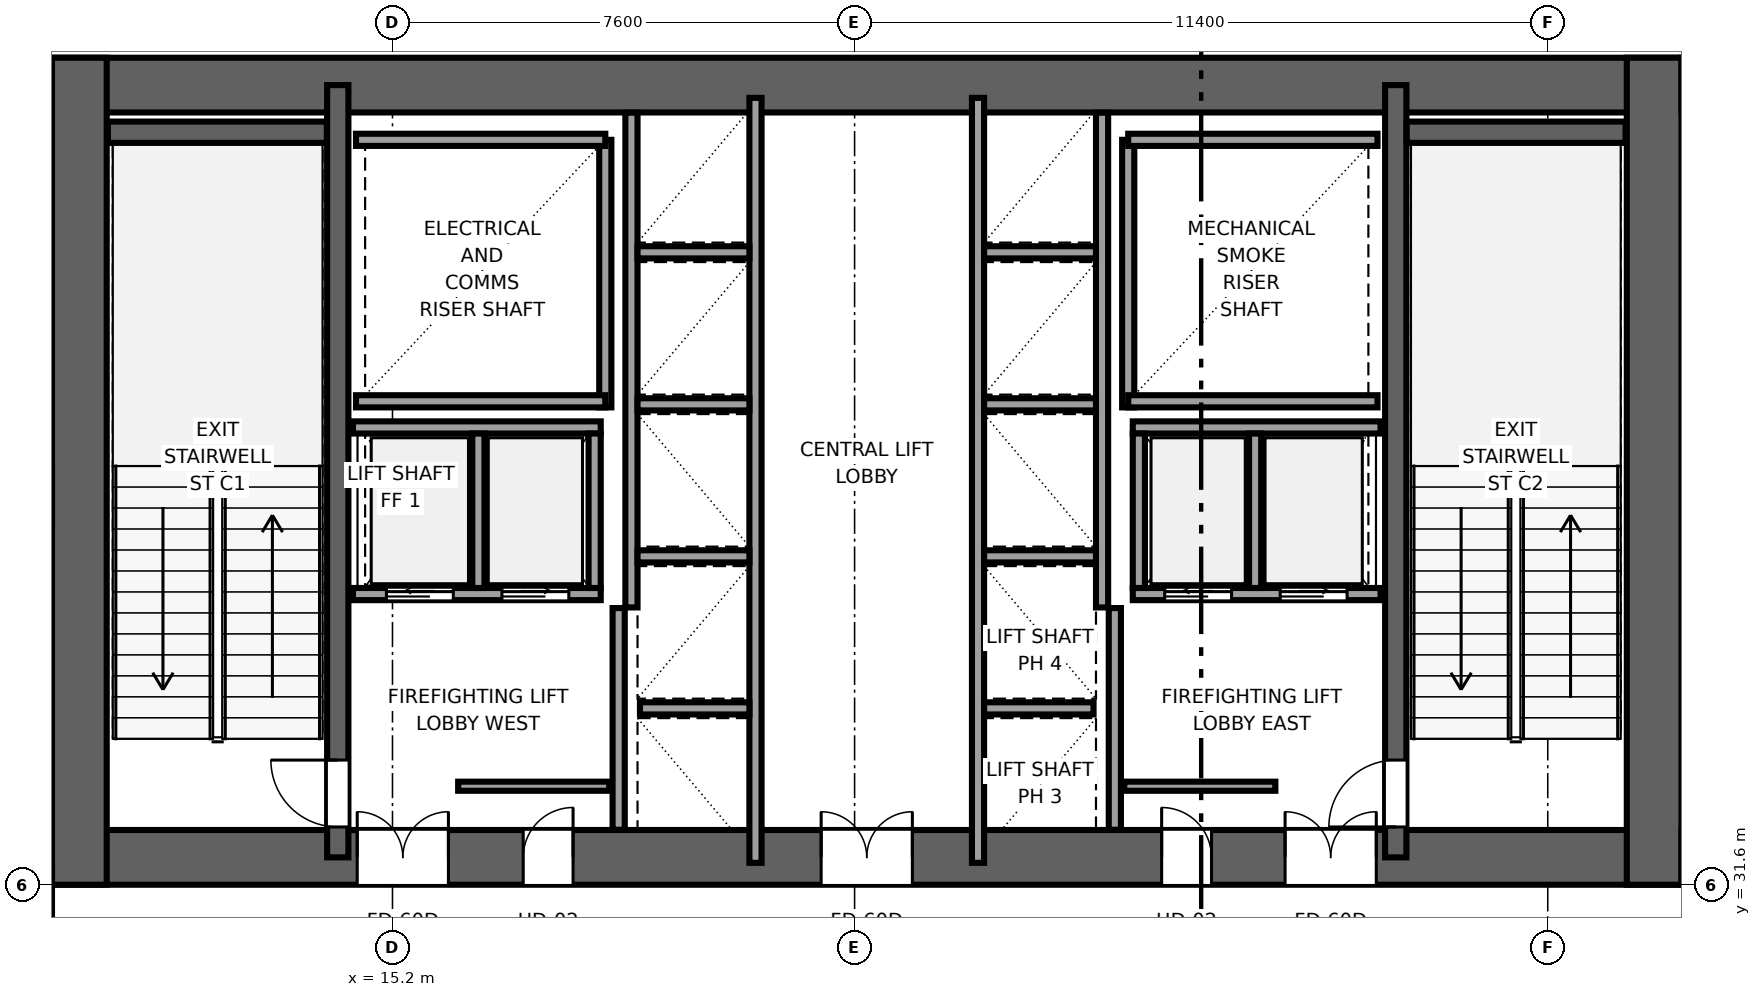
"""IFC4 building model, lengths in metres.
Left out: names, types, materials, properties, quantities, classifications, styles, units other than length and angle.
Written with IfcOpenShell. Run it as: python <this file> out.ifc"""

import sys

from ifc_helpers import new_model, si_unit, direction, frame, frame_2d, origin, place, context, subcontext, project, spatial, rectangle, extrude, source, transform, mapped, element, fill, save


model = new_model("IFC4")
c1 = context("Model", 3, precision=1e-05, world=origin(), true_north=direction((0.0, 1.0)))
c2 = subcontext(c1, "Body", "Model", "MODEL_VIEW")
j1 = project(units=[si_unit("LENGTHUNIT", "METRE"), si_unit("PLANEANGLEUNIT", "RADIAN")], contexts=[c1])
p1 = place(None, origin())
s1 = spatial("IfcSite", under=j1, at=p1, CompositionType="ELEMENT")
p2 = place(p1, origin())
s2 = spatial("IfcBuilding", under=s1, at=p2, CompositionType="ELEMENT")
p3 = place(p2, frame((0.0, 0.0, 11.0)))
s3 = spatial("IfcBuildingStorey", under=s2, at=p3, CompositionType="ELEMENT", Elevation=11.0)
p4 = place(p3, frame((9.6, 32.05, 0.0), z_axis=(0.0, 0.0, 1.0), x_axis=(1.0, 0.0, 0.0)))
e1 = element("IfcWall", 1, at=p4, inside=s3, PredefinedType="SHEAR", context=c2, shape_type="SweptSolid", body=[
    extrude(rectangle(XDim=26.8, YDim=0.9, at=frame_2d((13.4, 0.0))), origin(), (0.0, 0.0, 1.0), 5.0),
])
p5 = place(p4, frame((6.52, 0.0, 0.0), z_axis=(0.0, 0.0, 1.0), x_axis=(-1.0, 0.0, 0.0)))
e2 = element("IfcOpeningElement", 2, at=p5, cuts=e1, PredefinedType="OPENING", context=c2, shape_type="SweptSolid", body=[
    extrude(rectangle(XDim=1.5, YDim=2.04, at=frame_2d((0.75, 1.02))), frame((0.0, 0.46, 0.0), z_axis=(0.0, -1.0, 0.0), x_axis=(1.0, 0.0, 0.0)), (0.0, 0.0, 1.0), 0.92),
])
p6 = place(p4, frame((14.15, 0.0, 0.0), z_axis=(0.0, 0.0, 1.0), x_axis=(-1.0, 0.0, 0.0)))
e3 = element("IfcOpeningElement", 3, at=p6, cuts=e1, PredefinedType="OPENING", context=c2, shape_type="SweptSolid", body=[
    extrude(rectangle(XDim=1.5, YDim=2.04, at=frame_2d((0.75, 1.02))), frame((0.0, 0.46, 0.0), z_axis=(0.0, -1.0, 0.0), x_axis=(1.0, 0.0, 0.0)), (0.0, 0.0, 1.0), 0.92),
])
p7 = place(p4, frame((21.78, 0.0, 0.0), z_axis=(0.0, 0.0, 1.0), x_axis=(-1.0, 0.0, 0.0)))
e4 = element("IfcOpeningElement", 4, at=p7, cuts=e1, PredefinedType="OPENING", context=c2, shape_type="SweptSolid", body=[
    extrude(rectangle(XDim=1.5, YDim=2.04, at=frame_2d((0.75, 1.02))), frame((0.0, 0.46, 0.0), z_axis=(0.0, -1.0, 0.0), x_axis=(1.0, 0.0, 0.0)), (0.0, 0.0, 1.0), 0.92),
])
p8 = place(p4, frame((8.57, 0.0, 0.0), z_axis=(0.0, 0.0, 1.0), x_axis=(-1.0, 0.0, 0.0)))
e5 = element("IfcOpeningElement", 5, at=p8, cuts=e1, PredefinedType="OPENING", context=c2, shape_type="SweptSolid", body=[
    extrude(rectangle(XDim=0.82, YDim=2.01, at=frame_2d((0.41, 1.005))), frame((0.0, 0.46, 0.0), z_axis=(0.0, -1.0, 0.0), x_axis=(1.0, 0.0, 0.0)), (0.0, 0.0, 1.0), 0.92),
])
p9 = place(p4, frame((19.07, 0.0, 0.0), z_axis=(0.0, 0.0, 1.0), x_axis=(-1.0, 0.0, 0.0)))
e6 = element("IfcOpeningElement", 6, at=p9, cuts=e1, PredefinedType="OPENING", context=c2, shape_type="SweptSolid", body=[
    extrude(rectangle(XDim=0.82, YDim=2.01, at=frame_2d((0.41, 1.005))), frame((0.0, 0.46, 0.0), z_axis=(0.0, -1.0, 0.0), x_axis=(1.0, 0.0, 0.0)), (0.0, 0.0, 1.0), 0.92),
])
p10 = place(p3, frame((9.6, 44.75, 0.0), z_axis=(0.0, 0.0, 1.0), x_axis=(1.0, 0.0, 0.0)))
e7 = element("IfcWall", 7, at=p10, inside=s3, PredefinedType="SHEAR", context=c2, shape_type="SweptSolid", body=[
    extrude(rectangle(XDim=26.8, YDim=0.9, at=frame_2d((13.4, 0.0))), origin(), (0.0, 0.0, 1.0), 5.0),
])
for number, where, z_axis, x_axis in (
    (8, (10.05, 31.6, 0.0), (0.0, 0.0, 1.0), (0.0, 1.0, 0.0)),
    (9, (35.95, 31.6, 0.0), (0.0, 0.0, 1.0), (0.0, 1.0, 0.0)),
):
    element("IfcWall", number, at=place(p3, frame(where, z_axis=z_axis, x_axis=x_axis)), inside=s3, PredefinedType="SHEAR", context=c2, shape_type="SweptSolid", body=[
        extrude(rectangle(XDim=13.6, YDim=0.9, at=frame_2d((6.8, 0.0))), origin(), (0.0, 0.0, 1.0), 5.0),
    ])
p11 = place(p3, frame((14.3, 32.05, 0.0), z_axis=(0.0, 0.0, 1.0), x_axis=(0.0, 1.0, 0.0)))
e10 = element("IfcWall", 10, at=p11, inside=s3, PredefinedType="SHEAR", context=c2, shape_type="SweptSolid", body=[
    extrude(rectangle(XDim=12.7, YDim=0.35, at=frame_2d((6.35, 0.0))), origin(), (0.0, 0.0, 1.0), 5.0),
])
p12 = place(p11, frame((0.5, 0.0, 0.0)))
e11 = element("IfcOpeningElement", 11, at=p12, cuts=e10, PredefinedType="OPENING", context=c2, shape_type="SweptSolid", body=[
    extrude(rectangle(XDim=1.1, YDim=2.12, at=frame_2d((0.55, 1.06))), frame((0.0, 0.185, 0.0), z_axis=(0.0, -1.0, 0.0), x_axis=(1.0, 0.0, 0.0)), (0.0, 0.0, 1.0), 0.37),
])
p13 = place(p3, frame((31.7, 32.05, 0.0), z_axis=(0.0, 0.0, 1.0), x_axis=(0.0, 1.0, 0.0)))
e12 = element("IfcWall", 12, at=p13, inside=s3, PredefinedType="SHEAR", context=c2, shape_type="SweptSolid", body=[
    extrude(rectangle(XDim=12.7, YDim=0.35, at=frame_2d((6.35, 0.0))), origin(), (0.0, 0.0, 1.0), 5.0),
])
p14 = place(p13, frame((1.6, 0.0, 0.0), z_axis=(0.0, 0.0, 1.0), x_axis=(-1.0, 0.0, 0.0)))
e13 = element("IfcOpeningElement", 13, at=p14, cuts=e12, PredefinedType="OPENING", context=c2, shape_type="SweptSolid", body=[
    extrude(rectangle(XDim=1.1, YDim=2.12, at=frame_2d((0.55, 1.06))), frame((0.0, 0.185, 0.0), z_axis=(0.0, -1.0, 0.0), x_axis=(1.0, 0.0, 0.0)), (0.0, 0.0, 1.0), 0.37),
])
for number, where, z_axis, x_axis in (
    (14, (10.52, 43.975, 0.0), (0.0, 0.0, 1.0), (1.0, 0.0, 0.0)),
    (15, (31.88, 43.975, 0.0), (0.0, 0.0, 1.0), (1.0, 0.0, 0.0)),
):
    element("IfcWall", number, at=place(p3, frame(where, z_axis=z_axis, x_axis=x_axis)), inside=s3, PredefinedType="SHEAR", context=c2, shape_type="SweptSolid", body=[
        extrude(rectangle(XDim=3.6, YDim=0.35, at=frame_2d((1.8, 0.0))), origin(), (0.0, 0.0, 1.0), 5.0),
    ])
p15 = place(p3, frame((18.7, 39.45, 0.0), z_axis=(0.0, 0.0, 1.0), x_axis=(0.0, 1.0, 0.0)))
e16 = element("IfcWall", 16, at=p15, inside=s3, PredefinedType="SOLIDWALL", context=c2, shape_type="SweptSolid", body=[
    extrude(rectangle(XDim=4.4, YDim=0.2, at=frame_2d((2.2, 0.0))), origin(), (0.0, 0.0, 1.0), 4.74),
])
for number, where, z_axis, x_axis in (
    (17, (14.6, 39.55, 0.0), (0.0, 0.0, 1.0), (1.0, 0.0, 0.0)),
    (18, (14.6, 43.85, 0.0), (0.0, 0.0, 1.0), (1.0, 0.0, 0.0)),
):
    element("IfcWall", number, at=place(p3, frame(where, z_axis=z_axis, x_axis=x_axis)), inside=s3, PredefinedType="SOLIDWALL", context=c2, shape_type="SweptSolid", body=[
        extrude(rectangle(XDim=4.1, YDim=0.2, at=frame_2d((2.05, 0.0))), origin(), (0.0, 0.0, 1.0), 4.74),
    ])
p16 = place(p3, frame((27.3, 39.45, 0.0), z_axis=(0.0, 0.0, 1.0), x_axis=(0.0, 1.0, 0.0)))
e19 = element("IfcWall", 19, at=p16, inside=s3, PredefinedType="SOLIDWALL", context=c2, shape_type="SweptSolid", body=[
    extrude(rectangle(XDim=4.4, YDim=0.2, at=frame_2d((2.2, 0.0))), origin(), (0.0, 0.0, 1.0), 4.74),
])
for number, where, z_axis, x_axis in (
    (20, (27.3, 39.55, 0.0), (0.0, 0.0, 1.0), (1.0, 0.0, 0.0)),
    (21, (27.3, 43.85, 0.0), (0.0, 0.0, 1.0), (1.0, 0.0, 0.0)),
):
    element("IfcWall", number, at=place(p3, frame(where, z_axis=z_axis, x_axis=x_axis)), inside=s3, PredefinedType="SOLIDWALL", context=c2, shape_type="SweptSolid", body=[
        extrude(rectangle(XDim=4.1, YDim=0.2, at=frame_2d((2.05, 0.0))), origin(), (0.0, 0.0, 1.0), 4.74),
    ])
for number, where, z_axis, x_axis in (
    (22, (18.92, 32.504, 0.0), (0.0, 0.0, 1.0), (0.0, 1.0, 0.0)),
    (23, (27.08, 32.504, 0.0), (0.0, 0.0, 1.0), (0.0, 1.0, 0.0)),
):
    element("IfcWall", number, at=place(p3, frame(where, z_axis=z_axis, x_axis=x_axis)), inside=s3, PredefinedType="SOLIDWALL", context=c2, shape_type="SweptSolid", body=[
        extrude(rectangle(XDim=3.646, YDim=0.2, at=frame_2d((1.823, 0.0))), origin(), (0.0, 0.0, 1.0), 4.74),
    ])
p17 = place(p3, frame((21.17, 31.96, 0.0), z_axis=(0.0, 0.0, 1.0), x_axis=(0.0, 1.0, 0.0)))
e24 = element("IfcWall", 24, at=p17, inside=s3, PredefinedType="SOLIDWALL", context=c2, shape_type="SweptSolid", body=[
    extrude(rectangle(XDim=12.58, YDim=0.2, at=frame_2d((6.29, 0.0))), origin(), (0.0, 0.0, 1.0), 4.74),
])
p18 = place(p3, frame((19.13, 36.16, 0.0), z_axis=(0.0, 0.0, 1.0), x_axis=(0.0, 1.0, 0.0)))
e25 = element("IfcWall", 25, at=p18, inside=s3, PredefinedType="SOLIDWALL", context=c2, shape_type="SweptSolid", body=[
    extrude(rectangle(XDim=8.136, YDim=0.2, at=frame_2d((4.068, 0.0))), origin(), (0.0, 0.0, 1.0), 4.74),
])
p19 = place(p3, frame((19.27, 34.5, 0.0), z_axis=(0.0, 0.0, 1.0), x_axis=(1.0, 0.0, 0.0)))
e26 = element("IfcWall", 26, at=p19, inside=s3, PredefinedType="SOLIDWALL", context=c2, shape_type="SweptSolid", body=[
    extrude(rectangle(XDim=1.8, YDim=0.2, at=frame_2d((0.9, 0.0))), origin(), (0.0, 0.0, 1.0), 4.74),
])
for number, where, z_axis, x_axis in (
    (27, (19.23, 37.0, 0.0), (0.0, 0.0, 1.0), (1.0, 0.0, 0.0)),
    (28, (19.23, 39.5, 0.0), (0.0, 0.0, 1.0), (1.0, 0.0, 0.0)),
    (29, (19.23, 42.0, 0.0), (0.0, 0.0, 1.0), (1.0, 0.0, 0.0)),
):
    element("IfcWall", number, at=place(p3, frame(where, z_axis=z_axis, x_axis=x_axis)), inside=s3, PredefinedType="SOLIDWALL", context=c2, shape_type="SweptSolid", body=[
        extrude(rectangle(XDim=1.84, YDim=0.2, at=frame_2d((0.92, 0.0))), origin(), (0.0, 0.0, 1.0), 4.74),
    ])
p20 = place(p3, frame((27.375, 36.38, 0.0), z_axis=(0.0, 0.0, 1.0), x_axis=(1.0, 0.0, 0.0)))
e30 = element("IfcWall", 30, at=p20, inside=s3, PredefinedType="SOLIDWALL", context=c2, shape_type="SweptSolid", body=[
    extrude(rectangle(XDim=4.075, YDim=0.2, at=frame_2d((2.038, 0.0))), origin(), (0.0, 0.0, 1.0), 4.74),
])
p21 = place(p20, frame((0.525, 0.0, 0.0)))
e31 = element("IfcOpeningElement", 31, at=p21, cuts=e30, PredefinedType="OPENING", context=c2, shape_type="SweptSolid", body=[
    extrude(rectangle(XDim=1.1, YDim=2.12, at=frame_2d((0.55, 1.06))), frame((0.0, 0.11, 0.0), z_axis=(0.0, -1.0, 0.0), x_axis=(1.0, 0.0, 0.0)), (0.0, 0.0, 1.0), 0.22),
])
p22 = place(p20, frame((2.425, 0.0, 0.0)))
e32 = element("IfcOpeningElement", 32, at=p22, cuts=e30, PredefinedType="OPENING", context=c2, shape_type="SweptSolid", body=[
    extrude(rectangle(XDim=1.1, YDim=2.12, at=frame_2d((0.55, 1.06))), frame((0.0, 0.11, 0.0), z_axis=(0.0, -1.0, 0.0), x_axis=(1.0, 0.0, 0.0)), (0.0, 0.0, 1.0), 0.22),
])
p23 = place(p3, frame((27.375, 39.12, 0.0), z_axis=(0.0, 0.0, 1.0), x_axis=(1.0, 0.0, 0.0)))
e33 = element("IfcWall", 33, at=p23, inside=s3, PredefinedType="SOLIDWALL", context=c2, shape_type="SweptSolid", body=[
    extrude(rectangle(XDim=4.075, YDim=0.2, at=frame_2d((2.038, 0.0))), origin(), (0.0, 0.0, 1.0), 4.74),
])
for number, where, z_axis, x_axis in (
    (34, (27.475, 36.48, 0.0), (0.0, 0.0, 1.0), (0.0, 1.0, 0.0)),
    (35, (29.387, 36.48, 0.0), (0.0, 0.0, 1.0), (0.0, 1.0, 0.0)),
):
    element("IfcWall", number, at=place(p3, frame(where, z_axis=z_axis, x_axis=x_axis)), inside=s3, PredefinedType="SOLIDWALL", context=c2, shape_type="SweptSolid", body=[
        extrude(rectangle(XDim=2.54, YDim=0.2, at=frame_2d((1.27, 0.0))), origin(), (0.0, 0.0, 1.0), 4.74),
    ])
p24 = place(p3, frame((14.55, 36.38, 0.0), z_axis=(0.0, 0.0, 1.0), x_axis=(1.0, 0.0, 0.0)))
e36 = element("IfcWall", 36, at=p24, inside=s3, PredefinedType="SOLIDWALL", context=c2, shape_type="SweptSolid", body=[
    extrude(rectangle(XDim=4.075, YDim=0.2, at=frame_2d((2.038, 0.0))), origin(), (0.0, 0.0, 1.0), 4.74),
])
p25 = place(p24, frame((0.55, 0.0, 0.0)))
e37 = element("IfcOpeningElement", 37, at=p25, cuts=e36, PredefinedType="OPENING", context=c2, shape_type="SweptSolid", body=[
    extrude(rectangle(XDim=1.1, YDim=2.12, at=frame_2d((0.55, 1.06))), frame((0.0, 0.11, 0.0), z_axis=(0.0, -1.0, 0.0), x_axis=(1.0, 0.0, 0.0)), (0.0, 0.0, 1.0), 0.22),
])
p26 = place(p24, frame((2.45, 0.0, 0.0)))
e38 = element("IfcOpeningElement", 38, at=p26, cuts=e36, PredefinedType="OPENING", context=c2, shape_type="SweptSolid", body=[
    extrude(rectangle(XDim=1.1, YDim=2.12, at=frame_2d((0.55, 1.06))), frame((0.0, 0.11, 0.0), z_axis=(0.0, -1.0, 0.0), x_axis=(1.0, 0.0, 0.0)), (0.0, 0.0, 1.0), 0.22),
])
p27 = place(p3, frame((14.55, 39.12, 0.0), z_axis=(0.0, 0.0, 1.0), x_axis=(1.0, 0.0, 0.0)))
e39 = element("IfcWall", 39, at=p27, inside=s3, PredefinedType="SOLIDWALL", context=c2, shape_type="SweptSolid", body=[
    extrude(rectangle(XDim=4.075, YDim=0.2, at=frame_2d((2.038, 0.0))), origin(), (0.0, 0.0, 1.0), 4.74),
])
for number, where, z_axis, x_axis in (
    (40, (18.525, 36.48, 0.0), (0.0, 0.0, 1.0), (0.0, 1.0, 0.0)),
    (41, (16.613, 36.48, 0.0), (0.0, 0.0, 1.0), (0.0, 1.0, 0.0)),
):
    element("IfcWall", number, at=place(p3, frame(where, z_axis=z_axis, x_axis=x_axis)), inside=s3, PredefinedType="SOLIDWALL", context=c2, shape_type="SweptSolid", body=[
        extrude(rectangle(XDim=2.54, YDim=0.2, at=frame_2d((1.27, 0.0))), origin(), (0.0, 0.0, 1.0), 4.74),
    ])
p28 = place(p3, frame((24.83, 31.96, 0.0), z_axis=(0.0, 0.0, 1.0), x_axis=(0.0, 1.0, 0.0)))
e42 = element("IfcWall", 42, at=p28, inside=s3, PredefinedType="SOLIDWALL", context=c2, shape_type="SweptSolid", body=[
    extrude(rectangle(XDim=12.58, YDim=0.2, at=frame_2d((6.29, 0.0))), origin(), (0.0, 0.0, 1.0), 4.74),
])
p29 = place(p3, frame((26.87, 36.16, 0.0), z_axis=(0.0, 0.0, 1.0), x_axis=(0.0, 1.0, 0.0)))
e43 = element("IfcWall", 43, at=p29, inside=s3, PredefinedType="SOLIDWALL", context=c2, shape_type="SweptSolid", body=[
    extrude(rectangle(XDim=8.136, YDim=0.2, at=frame_2d((4.068, 0.0))), origin(), (0.0, 0.0, 1.0), 4.74),
])
p30 = place(p3, frame((24.93, 34.5, 0.0), z_axis=(0.0, 0.0, 1.0), x_axis=(1.0, 0.0, 0.0)))
e44 = element("IfcWall", 44, at=p30, inside=s3, PredefinedType="SOLIDWALL", context=c2, shape_type="SweptSolid", body=[
    extrude(rectangle(XDim=1.8, YDim=0.2, at=frame_2d((0.9, 0.0))), origin(), (0.0, 0.0, 1.0), 4.74),
])
for number, where, z_axis, x_axis in (
    (45, (24.93, 37.0, 0.0), (0.0, 0.0, 1.0), (1.0, 0.0, 0.0)),
    (46, (24.93, 39.5, 0.0), (0.0, 0.0, 1.0), (1.0, 0.0, 0.0)),
    (47, (24.93, 42.0, 0.0), (0.0, 0.0, 1.0), (1.0, 0.0, 0.0)),
):
    element("IfcWall", number, at=place(p3, frame(where, z_axis=z_axis, x_axis=x_axis)), inside=s3, PredefinedType="SOLIDWALL", context=c2, shape_type="SweptSolid", body=[
        extrude(rectangle(XDim=1.84, YDim=0.2, at=frame_2d((0.92, 0.0))), origin(), (0.0, 0.0, 1.0), 4.74),
    ])
for number, where, z_axis, x_axis in (
    (48, (16.28, 33.22, 0.0), (0.0, 0.0, 1.0), (1.0, 0.0, 0.0)),
    (49, (27.235, 33.22, 0.0), (0.0, 0.0, 1.0), (1.0, 0.0, 0.0)),
):
    element("IfcWall", number, at=place(p3, frame(where, z_axis=z_axis, x_axis=x_axis)), inside=s3, PredefinedType="PARTITIONING", context=c2, shape_type="SweptSolid", body=[
        extrude(rectangle(XDim=2.485, YDim=0.15, at=frame_2d((1.242, 0.0))), origin(), (0.0, 0.0, 1.0), 4.74),
    ])
m1 = source(origin(), c2, "Body", "SweptSolid", [
    extrude(rectangle(XDim=1.1, YDim=2.12, at=frame_2d((0.55, 1.06))), frame((0.0, 0.025, 0.0), z_axis=(0.0, -1.0, 0.0), x_axis=(1.0, 0.0, 0.0)), (0.0, 0.0, 1.0), 0.05),
])
p31 = place(p12, origin())
e50 = element("IfcDoor", 50, at=p31, inside=s3, OperationType="SINGLE_SWING_RIGHT", PredefinedType="DOOR", context=c2, shape_type="MappedRepresentation", body=[
    mapped(m1, transform((0.0, 0.0, 0.0), x_axis=(1.0, 0.0, 0.0), y_axis=(0.0, 1.0, 0.0), z_axis=(0.0, 0.0, 1.0), scale=1.0)),
])
fill(e11, e50)
p32 = place(p14, origin())
e51 = element("IfcDoor", 51, at=p32, inside=s3, OperationType="SINGLE_SWING_LEFT", PredefinedType="DOOR", context=c2, shape_type="MappedRepresentation", body=[
    mapped(m1, transform((0.0, 0.0, 0.0), x_axis=(1.0, 0.0, 0.0), y_axis=(0.0, 1.0, 0.0), z_axis=(0.0, 0.0, 1.0), scale=1.0)),
])
fill(e13, e51)
m2 = source(origin(), c2, "Body", "SweptSolid", [
    extrude(rectangle(XDim=1.5, YDim=2.04, at=frame_2d((0.75, 1.02))), frame((0.0, 0.025, 0.0), z_axis=(0.0, -1.0, 0.0), x_axis=(1.0, 0.0, 0.0)), (0.0, 0.0, 1.0), 0.05),
])
p33 = place(p5, origin())
e52 = element("IfcDoor", 52, at=p33, inside=s3, OperationType="DOUBLE_DOOR_SINGLE_SWING", PredefinedType="DOOR", context=c2, shape_type="MappedRepresentation", body=[
    mapped(m2, transform((0.0, 0.0, 0.0), x_axis=(1.0, 0.0, 0.0), y_axis=(0.0, 1.0, 0.0), z_axis=(0.0, 0.0, 1.0), scale=1.0)),
])
fill(e2, e52)
p34 = place(p6, origin())
e53 = element("IfcDoor", 53, at=p34, inside=s3, OperationType="DOUBLE_DOOR_SINGLE_SWING", PredefinedType="DOOR", context=c2, shape_type="MappedRepresentation", body=[
    mapped(m2, transform((0.0, 0.0, 0.0), x_axis=(1.0, 0.0, 0.0), y_axis=(0.0, 1.0, 0.0), z_axis=(0.0, 0.0, 1.0), scale=1.0)),
])
fill(e3, e53)
p35 = place(p7, origin())
e54 = element("IfcDoor", 54, at=p35, inside=s3, OperationType="DOUBLE_DOOR_SINGLE_SWING", PredefinedType="DOOR", context=c2, shape_type="MappedRepresentation", body=[
    mapped(m2, transform((0.0, 0.0, 0.0), x_axis=(1.0, 0.0, 0.0), y_axis=(0.0, 1.0, 0.0), z_axis=(0.0, 0.0, 1.0), scale=1.0)),
])
fill(e4, e54)
m3 = source(origin(), c2, "Body", "SweptSolid", [
    extrude(rectangle(XDim=0.82, YDim=2.01, at=frame_2d((0.41, 1.005))), frame((0.0, 0.025, 0.0), z_axis=(0.0, -1.0, 0.0), x_axis=(1.0, 0.0, 0.0)), (0.0, 0.0, 1.0), 0.05),
])
p36 = place(p8, origin())
e55 = element("IfcDoor", 55, at=p36, inside=s3, OperationType="SINGLE_SWING_RIGHT", PredefinedType="DOOR", context=c2, shape_type="MappedRepresentation", body=[
    mapped(m3, transform((0.0, 0.0, 0.0), x_axis=(1.0, 0.0, 0.0), y_axis=(0.0, 1.0, 0.0), z_axis=(0.0, 0.0, 1.0), scale=1.0)),
])
fill(e5, e55)
p37 = place(p9, origin())
e56 = element("IfcDoor", 56, at=p37, inside=s3, OperationType="SINGLE_SWING_LEFT", PredefinedType="DOOR", context=c2, shape_type="MappedRepresentation", body=[
    mapped(m3, transform((0.0, 0.0, 0.0), x_axis=(1.0, 0.0, 0.0), y_axis=(0.0, 1.0, 0.0), z_axis=(0.0, 0.0, 1.0), scale=1.0)),
])
fill(e6, e56)
m4 = source(origin(), c2, "Body", "SweptSolid", [
    extrude(rectangle(XDim=1.1, YDim=2.12, at=frame_2d((0.55, 1.06))), frame((0.0, 0.025, 0.0), z_axis=(0.0, -1.0, 0.0), x_axis=(1.0, 0.0, 0.0)), (0.0, 0.0, 1.0), 0.05),
])
p38 = place(p21, origin())
e57 = element("IfcDoor", 57, at=p38, inside=s3, OperationType="SLIDING_TO_LEFT", PredefinedType="DOOR", context=c2, shape_type="MappedRepresentation", body=[
    mapped(m4, transform((0.0, 0.0, 0.0), x_axis=(1.0, 0.0, 0.0), y_axis=(0.0, 1.0, 0.0), z_axis=(0.0, 0.0, 1.0), scale=1.0)),
])
fill(e31, e57)
p39 = place(p22, origin())
e58 = element("IfcDoor", 58, at=p39, inside=s3, OperationType="SLIDING_TO_RIGHT", PredefinedType="DOOR", context=c2, shape_type="MappedRepresentation", body=[
    mapped(m4, transform((0.0, 0.0, 0.0), x_axis=(1.0, 0.0, 0.0), y_axis=(0.0, 1.0, 0.0), z_axis=(0.0, 0.0, 1.0), scale=1.0)),
])
fill(e32, e58)
p40 = place(p25, origin())
e59 = element("IfcDoor", 59, at=p40, inside=s3, OperationType="SLIDING_TO_LEFT", PredefinedType="DOOR", context=c2, shape_type="MappedRepresentation", body=[
    mapped(m4, transform((0.0, 0.0, 0.0), x_axis=(1.0, 0.0, 0.0), y_axis=(0.0, 1.0, 0.0), z_axis=(0.0, 0.0, 1.0), scale=1.0)),
])
fill(e37, e59)
p41 = place(p26, origin())
e60 = element("IfcDoor", 60, at=p41, inside=s3, OperationType="SLIDING_TO_RIGHT", PredefinedType="DOOR", context=c2, shape_type="MappedRepresentation", body=[
    mapped(m4, transform((0.0, 0.0, 0.0), x_axis=(1.0, 0.0, 0.0), y_axis=(0.0, 1.0, 0.0), z_axis=(0.0, 0.0, 1.0), scale=1.0)),
])
fill(e38, e60)
save(model, sys.argv[1])
